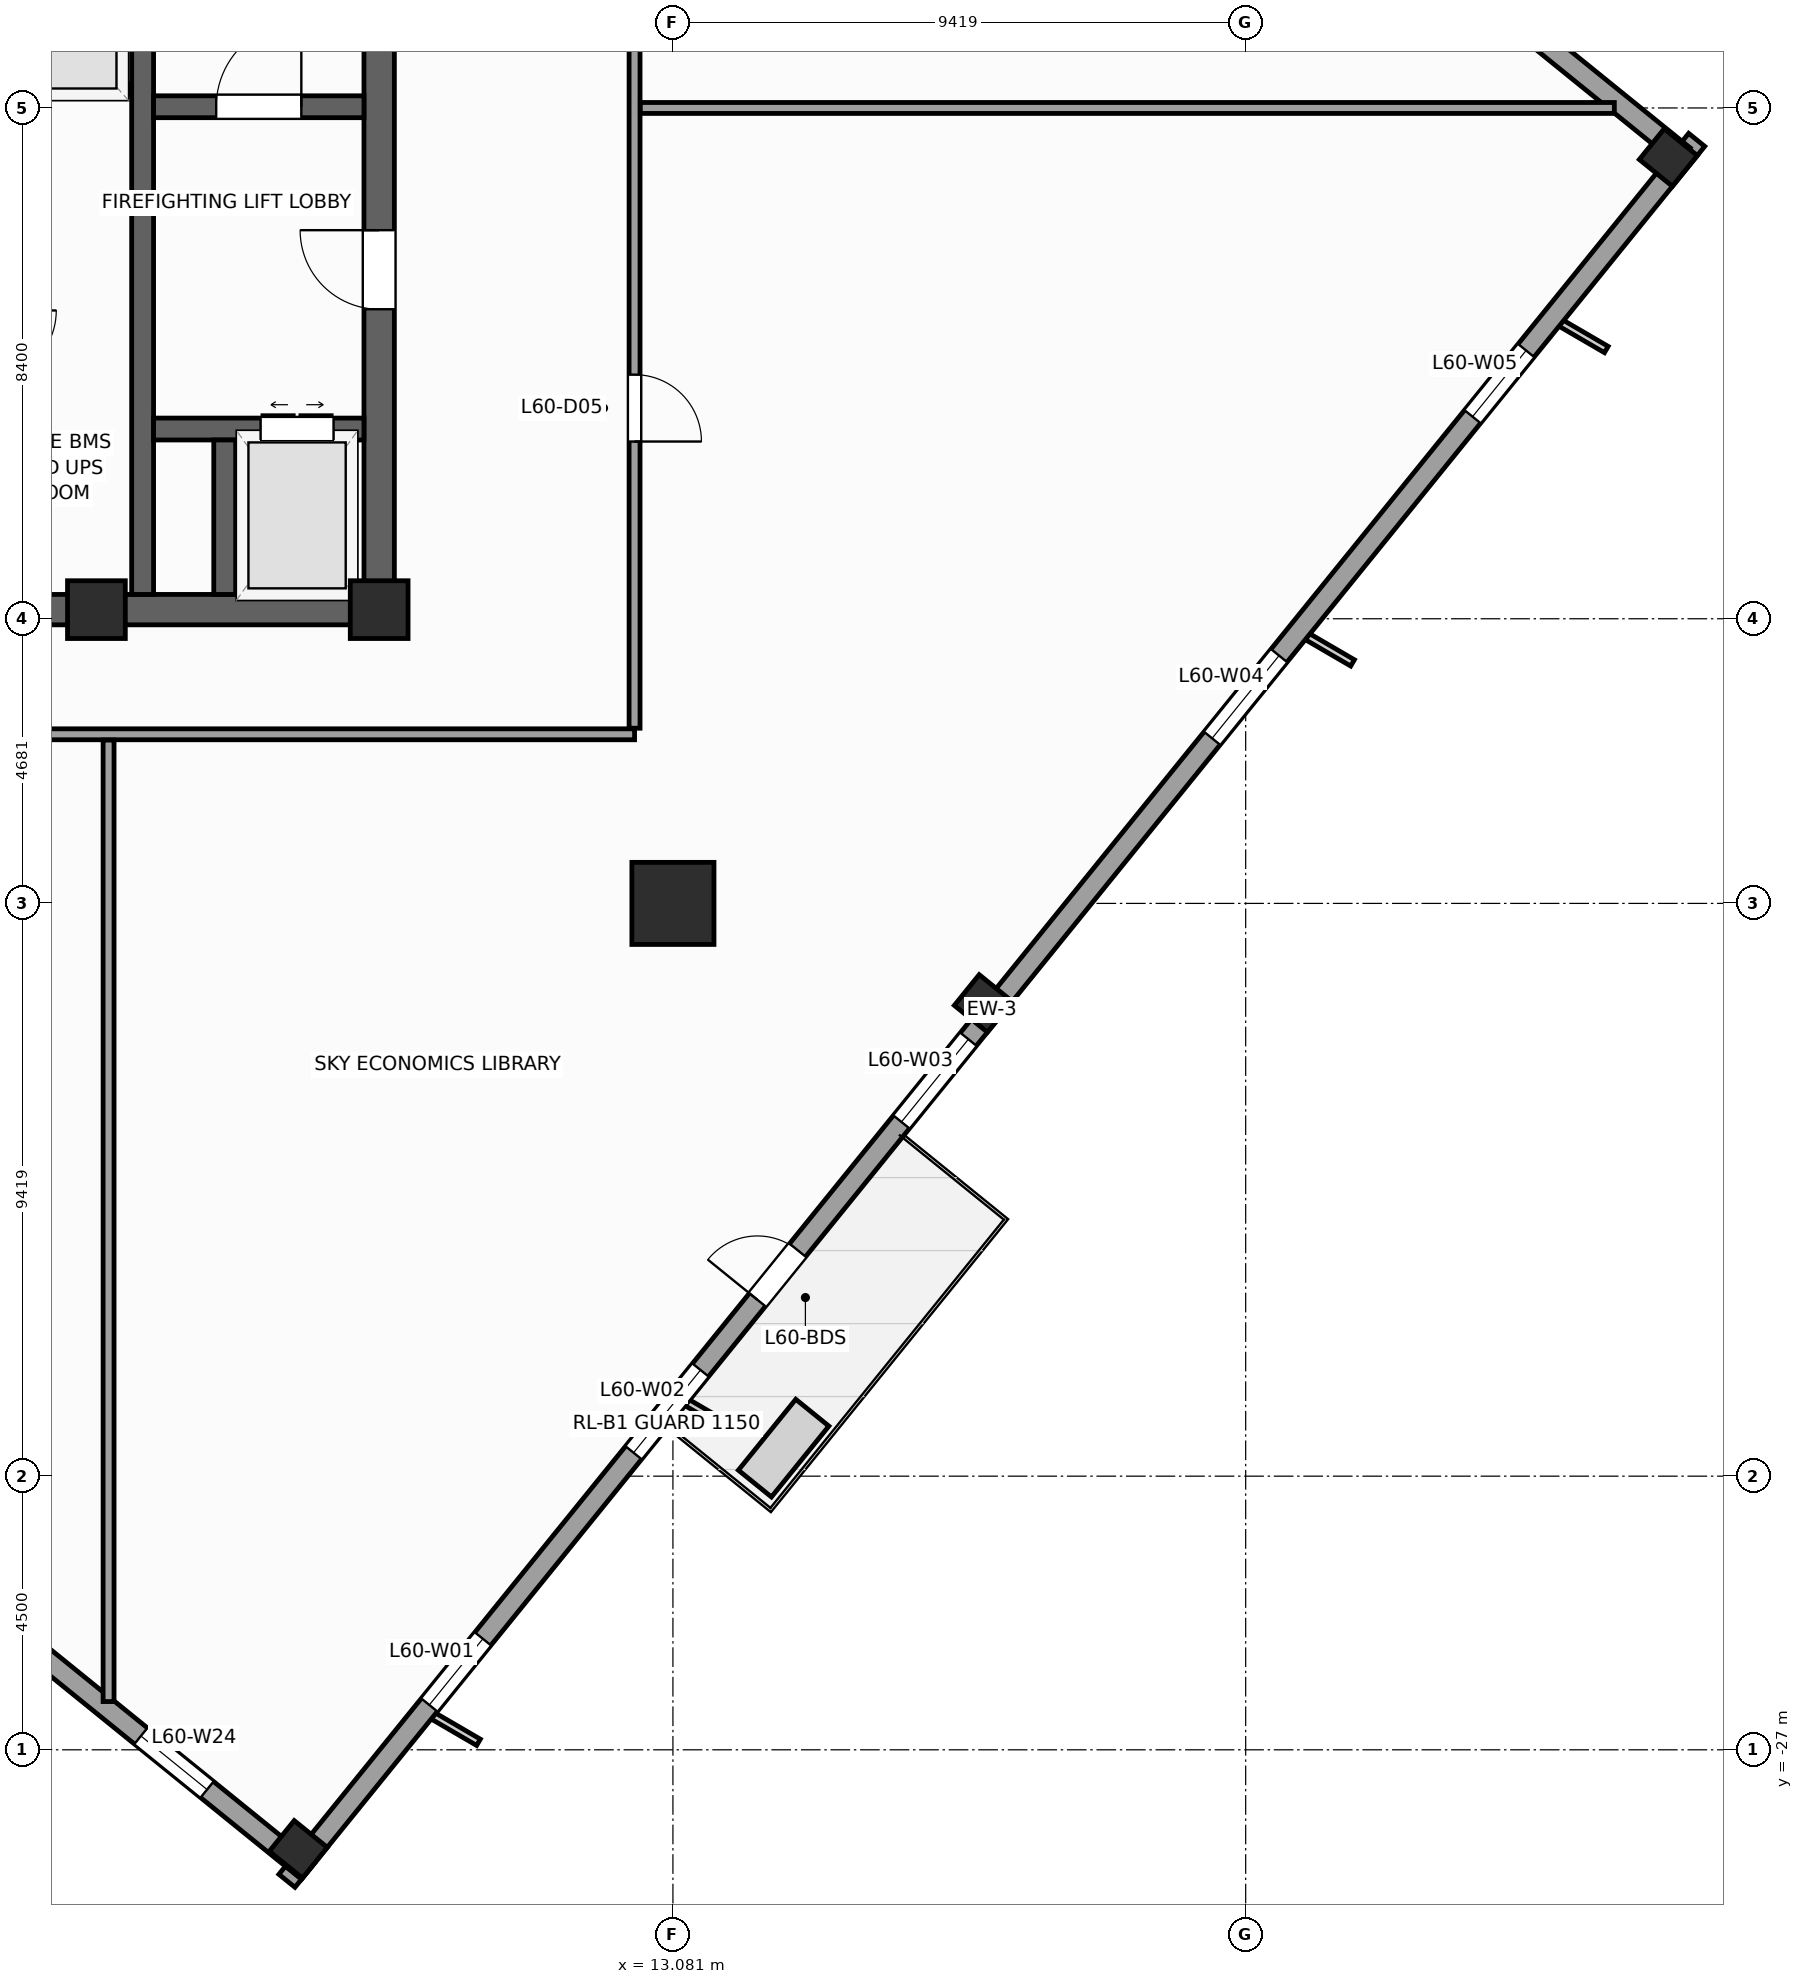
"""IFC4 building model, lengths in metres.
Left out: names, types, materials, properties, quantities, classifications, styles, units other than length and angle.
Written with IfcOpenShell. Run it as: python <this file> out.ifc"""

import sys

from ifc_helpers import new_model, si_unit, direction, frame, frame_2d, origin, origin_2d, place, context, subcontext, project, spatial, rectangle, extrude, source, transform, mapped, element, fill, save


model = new_model("IFC4")
c1 = context("Model", 3, precision=1e-05, world=origin(), true_north=direction((0.0, 1.0)))
c2 = subcontext(c1, "Body", "Model", "MODEL_VIEW")
j1 = project(units=[si_unit("LENGTHUNIT", "METRE"), si_unit("PLANEANGLEUNIT", "RADIAN")], contexts=[c1])
p1 = place(None, origin())
s1 = spatial("IfcSite", under=j1, at=p1, CompositionType="ELEMENT")
p2 = place(p1, origin())
s2 = spatial("IfcBuilding", under=s1, at=p2, CompositionType="ELEMENT")
p3 = place(p2, frame((0.0, 0.0, 248.5)))
s3 = spatial("IfcBuildingStorey", under=s2, at=p3, CompositionType="ELEMENT", Elevation=248.5)
p4 = place(p3, frame((-8.5, -8.25, 0.0), z_axis=(0.0, 0.0, 1.0), x_axis=(1.0, 0.0, 0.0)))
e1 = element("IfcWall", 1, at=p4, inside=s3, PredefinedType="SHEAR", context=c2, shape_type="SweptSolid", body=[
    extrude(rectangle(XDim=17.0, YDim=0.5, at=frame_2d((8.5, 0.0))), origin(), (0.0, 0.0, 1.0), 3.9),
])
p5 = place(p4, frame((7.85, 0.0, 0.0)))
e2 = element("IfcOpeningElement", 2, at=p5, cuts=e1, PredefinedType="OPENING", context=c2, shape_type="SweptSolid", body=[
    extrude(rectangle(XDim=1.3, YDim=2.2, at=frame_2d((0.65, 1.1))), frame((0.0, 0.26, 0.0), z_axis=(0.0, -1.0, 0.0), x_axis=(1.0, 0.0, 0.0)), (0.0, 0.0, 1.0), 0.52),
])
p6 = place(p3, frame((8.25, -8.0, 0.0), z_axis=(0.0, 0.0, 1.0), x_axis=(0.0, 1.0, 0.0)))
e3 = element("IfcWall", 3, at=p6, inside=s3, PredefinedType="SHEAR", context=c2, shape_type="SweptSolid", body=[
    extrude(rectangle(XDim=16.0, YDim=0.5, at=frame_2d((8.0, 0.0))), origin(), (0.0, 0.0, 1.0), 3.9),
])
p7 = place(p6, frame((4.69, 0.0, 0.0)))
e4 = element("IfcOpeningElement", 4, at=p7, cuts=e3, PredefinedType="OPENING", context=c2, shape_type="SweptSolid", body=[
    extrude(rectangle(XDim=1.3, YDim=2.2, at=frame_2d((0.65, 1.1))), frame((0.0, 0.26, 0.0), z_axis=(0.0, -1.0, 0.0), x_axis=(1.0, 0.0, 0.0)), (0.0, 0.0, 1.0), 0.52),
])
p8 = place(p3, frame((4.36, -8.0, 0.0), z_axis=(0.0, 0.0, 1.0), x_axis=(0.0, 1.0, 0.0)))
e5 = element("IfcWall", 5, at=p8, inside=s3, PredefinedType="SHEAR", context=c2, shape_type="SweptSolid", body=[
    extrude(rectangle(XDim=16.0, YDim=0.36, at=frame_2d((8.0, 0.0))), origin(), (0.0, 0.0, 1.0), 3.9),
])
p9 = place(p3, frame((4.54, 0.02, 0.0), z_axis=(0.0, 0.0, 1.0), x_axis=(1.0, 0.0, 0.0)))
e6 = element("IfcWall", 6, at=p9, inside=s3, PredefinedType="SHEAR", context=c2, shape_type="SweptSolid", body=[
    extrude(rectangle(XDim=3.46, YDim=0.36, at=frame_2d((1.73, 0.0))), origin(), (0.0, 0.0, 1.0), 3.9),
])
p10 = place(p9, frame((1.03, 0.0, 0.0)))
e7 = element("IfcOpeningElement", 7, at=p10, cuts=e6, PredefinedType="OPENING", context=c2, shape_type="SweptSolid", body=[
    extrude(rectangle(XDim=1.4, YDim=2.2, at=frame_2d((0.7, 1.1))), frame((0.0, 0.19, 0.0), z_axis=(0.0, -1.0, 0.0), x_axis=(1.0, 0.0, 0.0)), (0.0, 0.0, 1.0), 0.38),
])
p11 = place(p3, frame((4.54, -5.28, 0.0), z_axis=(0.0, 0.0, 1.0), x_axis=(1.0, 0.0, 0.0)))
e8 = element("IfcWall", 8, at=p11, inside=s3, PredefinedType="SHEAR", context=c2, shape_type="SweptSolid", body=[
    extrude(rectangle(XDim=3.46, YDim=0.36, at=frame_2d((1.73, 0.0))), origin(), (0.0, 0.0, 1.0), 3.9),
])
p12 = place(p11, frame((1.76, 0.0, 0.0)))
e9 = element("IfcOpeningElement", 9, at=p12, cuts=e8, PredefinedType="OPENING", context=c2, shape_type="SweptSolid", body=[
    extrude(rectangle(XDim=1.2, YDim=2.25, at=frame_2d((0.6, 1.125))), frame((0.0, 0.19, 0.0), z_axis=(0.0, -1.0, 0.0), x_axis=(1.0, 0.0, 0.0)), (0.0, 0.0, 1.0), 0.38),
])
p13 = place(p3, frame((5.71, -8.0, 0.0), z_axis=(0.0, 0.0, 1.0), x_axis=(0.0, 1.0, 0.0)))
e10 = element("IfcWall", 10, at=p13, inside=s3, PredefinedType="SHEAR", context=c2, shape_type="SweptSolid", body=[
    extrude(rectangle(XDim=2.54, YDim=0.36, at=frame_2d((1.27, 0.0))), origin(), (0.0, 0.0, 1.0), 3.9),
])
m1 = source(origin(), c2, "Body", "SweptSolid", [
    extrude(rectangle(XDim=0.95, YDim=0.95, at=origin_2d()), origin(), (0.0, 0.0, 1.0), 3.9),
])
for number, where, z_axis, x_axis in (
    (11, (8.25, -8.25, 0.0), (0.0, 0.0, 1.0), (1.0, 0.0, 0.0)),
    (12, (3.6, -8.25, 0.0), (0.0, 0.0, 1.0), (1.0, 0.0, 0.0)),
):
    element("IfcColumn", number, at=place(p3, frame(where, z_axis=z_axis, x_axis=x_axis)), inside=s3, PredefinedType="PILASTER", context=c2, shape_type="MappedRepresentation", body=[
        mapped(m1, transform((0.0, 0.0, 0.0), scale=1.0)),
    ])
m2 = source(origin(), c2, "Body", "SweptSolid", [
    extrude(rectangle(XDim=1.35, YDim=1.35, at=origin_2d()), origin(), (0.0, 0.0, 1.0), 3.9),
])
p14 = place(p3, frame((13.081, -13.081, 0.0), z_axis=(0.0, 0.0, 1.0), x_axis=(1.0, 0.0, 0.0)))
e13 = element("IfcColumn", 13, at=p14, inside=s3, PredefinedType="COLUMN", context=c2, shape_type="MappedRepresentation", body=[
    mapped(m2, transform((0.0, 0.0, 0.0), scale=1.0)),
])
m3 = source(origin(), c2, "Body", "SweptSolid", [
    extrude(rectangle(XDim=0.65, YDim=0.7, at=origin_2d()), origin(), (0.0, 0.0, 1.0), 3.9),
])
for number, where, z_axis, x_axis in (
    (14, (6.92, -28.637, 0.0), (0.0, 0.0, 1.0), (0.629, 0.777, 0.0)),
    (15, (18.185, -14.726, 0.0), (0.0, 0.0, 1.0), (0.629, 0.777, 0.0)),
    (16, (29.45, -0.815, 0.0), (0.0, 0.0, 1.0), (0.629, 0.777, 0.0)),
):
    element("IfcColumn", number, at=place(p3, frame(where, z_axis=z_axis, x_axis=x_axis)), inside=s3, PredefinedType="COLUMN", context=c2, shape_type="MappedRepresentation", body=[
        mapped(m3, transform((0.0, 0.0, 0.0), scale=1.0)),
    ])
p15 = place(p3, frame((6.733, -29.154, 0.0), z_axis=(0.0, 0.0, 1.0), x_axis=(0.629325378072, 0.77714192302, 0.0)))
e17 = element("IfcWall", 17, at=p15, inside=s3, PredefinedType="STANDARD", context=c2, shape_type="SweptSolid", body=[
    extrude(rectangle(XDim=36.84, YDim=0.34, at=frame_2d((18.42, 0.0))), origin(), (0.0, 0.0, 1.0), 2.96),
])
p16 = place(p15, frame((12.295, 0.0, 0.0)))
e18 = element("IfcOpeningElement", 18, at=p16, cuts=e17, PredefinedType="OPENING", context=c2, shape_type="SweptSolid", body=[
    extrude(rectangle(XDim=1.05, YDim=2.25, at=frame_2d((0.525, 1.125))), frame((0.0, 0.18, 0.0), z_axis=(0.0, -1.0, 0.0), x_axis=(1.0, 0.0, 0.0)), (0.0, 0.0, 1.0), 0.36),
])
p17 = place(p15, frame((3.721, 0.0, 0.48)))
e19 = element("IfcOpeningElement", 19, at=p17, cuts=e17, PredefinedType="OPENING", context=c2, shape_type="SweptSolid", body=[
    extrude(rectangle(XDim=1.4, YDim=2.4, at=frame_2d((0.7, 1.2))), frame((0.0, 0.18, 0.0), z_axis=(0.0, -1.0, 0.0), x_axis=(1.0, 0.0, 0.0)), (0.0, 0.0, 1.0), 0.36),
])
p18 = place(p15, frame((9.059, 0.0, 0.58)))
e20 = element("IfcOpeningElement", 20, at=p18, cuts=e17, PredefinedType="OPENING", context=c2, shape_type="SweptSolid", body=[
    extrude(rectangle(XDim=1.75, YDim=2.3, at=frame_2d((0.875, 1.15))), frame((0.0, 0.18, 0.0), z_axis=(0.0, -1.0, 0.0), x_axis=(1.0, 0.0, 0.0)), (0.0, 0.0, 1.0), 0.36),
])
p19 = place(p15, frame((16.058, 0.0, 0.58)))
e21 = element("IfcOpeningElement", 21, at=p19, cuts=e17, PredefinedType="OPENING", context=c2, shape_type="SweptSolid", body=[
    extrude(rectangle(XDim=1.75, YDim=2.3, at=frame_2d((0.875, 1.15))), frame((0.0, 0.18, 0.0), z_axis=(0.0, -1.0, 0.0), x_axis=(1.0, 0.0, 0.0)), (0.0, 0.0, 1.0), 0.36),
])
p20 = place(p15, frame((24.176, 0.0, 0.58)))
e22 = element("IfcOpeningElement", 22, at=p20, cuts=e17, PredefinedType="OPENING", context=c2, shape_type="SweptSolid", body=[
    extrude(rectangle(XDim=1.75, YDim=2.3, at=frame_2d((0.875, 1.15))), frame((0.0, 0.18, 0.0), z_axis=(0.0, -1.0, 0.0), x_axis=(1.0, 0.0, 0.0)), (0.0, 0.0, 1.0), 0.36),
])
p21 = place(p15, frame((30.982, 0.0, 0.48)))
e23 = element("IfcOpeningElement", 23, at=p21, cuts=e17, PredefinedType="OPENING", context=c2, shape_type="SweptSolid", body=[
    extrude(rectangle(XDim=1.4, YDim=2.4, at=frame_2d((0.7, 1.2))), frame((0.0, 0.18, 0.0), z_axis=(0.0, -1.0, 0.0), x_axis=(1.0, 0.0, 0.0)), (0.0, 0.0, 1.0), 0.36),
])
p22 = place(p3, frame((29.703, -0.789, 0.0), z_axis=(0.0, 0.0, 1.0), x_axis=(-0.77714355312, 0.629323365087, 0.0)))
e24 = element("IfcWall", 24, at=p22, inside=s3, PredefinedType="STANDARD", context=c2, shape_type="SweptSolid", body=[
    extrude(rectangle(XDim=5.5, YDim=0.34, at=frame_2d((2.75, 0.0))), origin(), (0.0, 0.0, 1.0), 3.66),
])
p23 = place(p3, frame((2.673, -25.429, 0.0), z_axis=(0.0, 0.0, 1.0), x_axis=(0.777162640055, -0.629299794138, 0.0)))
e25 = element("IfcWall", 25, at=p23, inside=s3, PredefinedType="STANDARD", context=c2, shape_type="SweptSolid", body=[
    extrude(rectangle(XDim=5.67, YDim=0.34, at=frame_2d((2.835, 0.0))), origin(), (0.0, 0.0, 1.0), 3.66),
])
p24 = place(p23, frame((2.135, 0.0, 0.48)))
e26 = element("IfcOpeningElement", 26, at=p24, cuts=e25, PredefinedType="OPENING", context=c2, shape_type="SweptSolid", body=[
    extrude(rectangle(XDim=1.4, YDim=2.4, at=frame_2d((0.7, 1.2))), frame((0.0, 0.18, 0.0), z_axis=(0.0, -1.0, 0.0), x_axis=(1.0, 0.0, 0.0)), (0.0, 0.0, 1.0), 0.36),
])
p25 = place(p3, frame((1.89, 0.3, 0.0), z_axis=(0.0, 0.0, 1.0), x_axis=(1.0, 0.0, 0.0)))
e27 = element("IfcWall", 27, at=p25, inside=s3, PredefinedType="PARTITIONING", context=c2, shape_type="SweptSolid", body=[
    extrude(rectangle(XDim=2.28, YDim=0.18, at=frame_2d((1.14, 0.0))), origin(), (0.0, 0.0, 1.0), 3.66),
])
p26 = place(p3, frame((-10.3, -10.3, 0.0), z_axis=(0.0, 0.0, 1.0), x_axis=(1.0, 0.0, 0.0)))
e28 = element("IfcWall", 28, at=p26, inside=s3, PredefinedType="PARTITIONING", context=c2, shape_type="SweptSolid", body=[
    extrude(rectangle(XDim=22.75, YDim=0.18, at=frame_2d((11.375, 0.0))), origin(), (0.0, 0.0, 1.0), 3.66),
])
p27 = place(p26, frame((9.75, 0.0, 0.0)))
e29 = element("IfcOpeningElement", 29, at=p27, cuts=e28, PredefinedType="OPENING", context=c2, shape_type="SweptSolid", body=[
    extrude(rectangle(XDim=1.1, YDim=2.2, at=frame_2d((0.55, 1.1))), frame((0.0, 0.1, 0.0), z_axis=(0.0, -1.0, 0.0), x_axis=(1.0, 0.0, 0.0)), (0.0, 0.0, 1.0), 0.2),
])
p28 = place(p26, frame((2.865, 0.0, 0.0)))
e30 = element("IfcOpeningElement", 30, at=p28, cuts=e28, PredefinedType="OPENING", context=c2, shape_type="SweptSolid", body=[
    extrude(rectangle(XDim=1.1, YDim=2.2, at=frame_2d((0.55, 1.1))), frame((0.0, 0.1, 0.0), z_axis=(0.0, -1.0, 0.0), x_axis=(1.0, 0.0, 0.0)), (0.0, 0.0, 1.0), 0.2),
])
p29 = place(p3, frame((12.45, -10.2, 0.0), z_axis=(0.0, 0.0, 1.0), x_axis=(0.0, 1.0, 0.0)))
e31 = element("IfcWall", 31, at=p29, inside=s3, PredefinedType="PARTITIONING", context=c2, shape_type="SweptSolid", body=[
    extrude(rectangle(XDim=21.5, YDim=0.18, at=frame_2d((10.75, 0.0))), origin(), (0.0, 0.0, 1.0), 3.66),
])
p30 = place(p29, frame((15.135, 0.0, 0.0)))
e32 = element("IfcOpeningElement", 32, at=p30, cuts=e31, PredefinedType="OPENING", context=c2, shape_type="SweptSolid", body=[
    extrude(rectangle(XDim=1.1, YDim=2.2, at=frame_2d((0.55, 1.1))), frame((0.0, 0.1, 0.0), z_axis=(0.0, -1.0, 0.0), x_axis=(1.0, 0.0, 0.0)), (0.0, 0.0, 1.0), 0.2),
])
p31 = place(p29, frame((4.714, 0.0, 0.0)))
e33 = element("IfcOpeningElement", 33, at=p31, cuts=e31, PredefinedType="OPENING", context=c2, shape_type="SweptSolid", body=[
    extrude(rectangle(XDim=1.1, YDim=2.2, at=frame_2d((0.55, 1.1))), frame((0.0, 0.1, 0.0), z_axis=(0.0, -1.0, 0.0), x_axis=(1.0, 0.0, 0.0)), (0.0, 0.0, 1.0), 0.2),
])
p32 = place(p3, frame((12.545, 0.0, 0.0), z_axis=(0.0, 0.0, 1.0), x_axis=(1.0, 0.0, 0.0)))
e34 = element("IfcWall", 34, at=p32, inside=s3, PredefinedType="PARTITIONING", context=c2, shape_type="SweptSolid", body=[
    extrude(rectangle(XDim=16.018, YDim=0.18, at=frame_2d((8.009, 0.0))), origin(), (0.0, 0.0, 1.0), 3.66),
])
p33 = place(p3, frame((3.8, -10.395, 0.0), z_axis=(0.0, 0.0, 1.0), x_axis=(0.0, -1.0, 0.0)))
e35 = element("IfcWall", 35, at=p33, inside=s3, PredefinedType="PARTITIONING", context=c2, shape_type="SweptSolid", body=[
    extrude(rectangle(XDim=15.812, YDim=0.18, at=frame_2d((7.906, 0.0))), origin(), (0.0, 0.0, 1.0), 3.66),
])
m4 = source(origin(), c2, "Body", "SweptSolid", [
    extrude(rectangle(XDim=1.05, YDim=2.25, at=frame_2d((0.525, 1.125))), frame((0.0, 0.025, 0.0), z_axis=(0.0, -1.0, 0.0), x_axis=(1.0, 0.0, 0.0)), (0.0, 0.0, 1.0), 0.05),
])
p34 = place(p16, origin())
e36 = element("IfcDoor", 36, at=p34, inside=s3, OperationType="SINGLE_SWING_LEFT", PredefinedType="DOOR", context=c2, shape_type="MappedRepresentation", body=[
    mapped(m4, transform((0.0, 0.0, 0.0), scale=1.0)),
])
fill(e18, e36)
m5 = source(origin(), c2, "Body", "SweptSolid", [
    extrude(rectangle(XDim=1.4, YDim=2.4, at=frame_2d((0.7, 1.2))), frame((0.0, 0.03, 0.0), z_axis=(0.0, -1.0, 0.0), x_axis=(1.0, 0.0, 0.0)), (0.0, 0.0, 1.0), 0.06),
])
p35 = place(p17, origin())
e37 = element("IfcWindow", 37, at=p35, inside=s3, PartitioningType="SINGLE_PANEL", PredefinedType="WINDOW", context=c2, shape_type="MappedRepresentation", body=[
    mapped(m5, transform((0.0, 0.0, 0.0), scale=1.0)),
])
fill(e19, e37)
m6 = source(origin(), c2, "Body", "SweptSolid", [
    extrude(rectangle(XDim=1.75, YDim=2.3, at=frame_2d((0.875, 1.15))), frame((0.0, 0.03, 0.0), z_axis=(0.0, -1.0, 0.0), x_axis=(1.0, 0.0, 0.0)), (0.0, 0.0, 1.0), 0.06),
])
p36 = place(p18, origin())
e38 = element("IfcWindow", 38, at=p36, inside=s3, PartitioningType="SINGLE_PANEL", PredefinedType="WINDOW", context=c2, shape_type="MappedRepresentation", body=[
    mapped(m6, transform((0.0, 0.0, 0.0), scale=1.0)),
])
fill(e20, e38)
p37 = place(p19, origin())
e39 = element("IfcWindow", 39, at=p37, inside=s3, PartitioningType="SINGLE_PANEL", PredefinedType="WINDOW", context=c2, shape_type="MappedRepresentation", body=[
    mapped(m6, transform((0.0, 0.0, 0.0), scale=1.0)),
])
fill(e21, e39)
p38 = place(p20, origin())
e40 = element("IfcWindow", 40, at=p38, inside=s3, PartitioningType="SINGLE_PANEL", PredefinedType="WINDOW", context=c2, shape_type="MappedRepresentation", body=[
    mapped(m6, transform((0.0, 0.0, 0.0), scale=1.0)),
])
fill(e22, e40)
p39 = place(p21, origin())
e41 = element("IfcWindow", 41, at=p39, inside=s3, PartitioningType="SINGLE_PANEL", PredefinedType="WINDOW", context=c2, shape_type="MappedRepresentation", body=[
    mapped(m5, transform((0.0, 0.0, 0.0), scale=1.0)),
])
fill(e23, e41)
p40 = place(p24, origin())
e42 = element("IfcWindow", 42, at=p40, inside=s3, PartitioningType="SINGLE_PANEL", PredefinedType="WINDOW", context=c2, shape_type="MappedRepresentation", body=[
    mapped(m5, transform((0.0, 0.0, 0.0), scale=1.0)),
])
fill(e26, e42)
m7 = source(origin(), c2, "Body", "SweptSolid", [
    extrude(rectangle(XDim=1.4, YDim=2.2, at=frame_2d((0.7, 1.1))), frame((0.0, 0.025, 0.0), z_axis=(0.0, -1.0, 0.0), x_axis=(1.0, 0.0, 0.0)), (0.0, 0.0, 1.0), 0.05),
])
p41 = place(p10, origin())
e43 = element("IfcDoor", 43, at=p41, inside=s3, OperationType="SINGLE_SWING_RIGHT", PredefinedType="DOOR", context=c2, shape_type="MappedRepresentation", body=[
    mapped(m7, transform((0.0, 0.0, 0.0), scale=1.0)),
])
fill(e7, e43)
m8 = source(origin(), c2, "Body", "SweptSolid", [
    extrude(rectangle(XDim=1.3, YDim=2.2, at=frame_2d((0.65, 1.1))), frame((0.0, 0.025, 0.0), z_axis=(0.0, -1.0, 0.0), x_axis=(1.0, 0.0, 0.0)), (0.0, 0.0, 1.0), 0.05),
])
p42 = place(p7, origin())
e44 = element("IfcDoor", 44, at=p42, inside=s3, OperationType="SINGLE_SWING_RIGHT", PredefinedType="DOOR", context=c2, shape_type="MappedRepresentation", body=[
    mapped(m8, transform((0.0, 0.0, 0.0), scale=1.0)),
])
fill(e4, e44)
m9 = source(origin(), c2, "Body", "SweptSolid", [
    extrude(rectangle(XDim=1.2, YDim=2.25, at=frame_2d((0.6, 1.125))), frame((0.0, 0.025, 0.0), z_axis=(0.0, -1.0, 0.0), x_axis=(1.0, 0.0, 0.0)), (0.0, 0.0, 1.0), 0.05),
])
p43 = place(p12, origin())
e45 = element("IfcDoor", 45, at=p43, inside=s3, OperationType="DOUBLE_DOOR_SLIDING", PredefinedType="DOOR", context=c2, shape_type="MappedRepresentation", body=[
    mapped(m9, transform((0.0, 0.0, 0.0), scale=1.0)),
])
fill(e9, e45)
m10 = source(origin(), c2, "Body", "SweptSolid", [
    extrude(rectangle(XDim=1.1, YDim=2.2, at=frame_2d((0.55, 1.1))), frame((0.0, 0.025, 0.0), z_axis=(0.0, -1.0, 0.0), x_axis=(1.0, 0.0, 0.0)), (0.0, 0.0, 1.0), 0.05),
])
p44 = place(p31, frame((1.1, 0.0, 0.0), z_axis=(0.0, 0.0, 1.0), x_axis=(-1.0, 0.0, 0.0)))
e46 = element("IfcDoor", 46, at=p44, inside=s3, OperationType="SINGLE_SWING_LEFT", PredefinedType="DOOR", context=c2, shape_type="MappedRepresentation", body=[
    mapped(m10, transform((0.0, 0.0, 0.0), scale=1.0)),
])
fill(e33, e46)
save(model, sys.argv[1])
